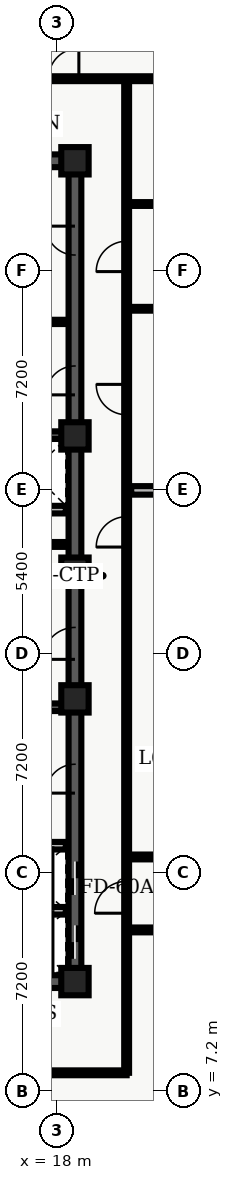
"""IFC4 building model, lengths in metres.
Left out: names, types, materials, properties, quantities, classifications, styles, units other than length and angle.
Written with IfcOpenShell. Run it as: python <this file> out.ifc"""

import sys

from ifc_helpers import new_model, entity, si_unit, converted_unit, direction, frame, origin_with_axes, origin_2d_with_axis, place, context, subcontext, project, spatial, polyline, rectangle, outline, extrude, element, fill, save


model = new_model("IFC4")
c1 = context("Model", 3, precision=1e-05, world=origin_with_axes(), true_north=direction((0.0, 1.0)))
c2 = subcontext(c1, "Body", "Model", "MODEL_VIEW")
j1 = project(units=[si_unit("LENGTHUNIT", "METRE"), converted_unit("PLANEANGLEUNIT", "DEGREE", entity("IfcPlaneAngleMeasure", 0.017), si_unit("PLANEANGLEUNIT", "RADIAN"), dimensions=[0, 0, 0, 0, 0, 0, 0])], contexts=[c1])
p1 = place(None, origin_with_axes())
s1 = spatial("IfcSite", under=j1, at=p1, CompositionType="ELEMENT")
p2 = place(p1, origin_with_axes())
s2 = spatial("IfcBuilding", under=s1, at=p2, CompositionType="ELEMENT")
p3 = place(p2, frame((0.0, 0.0, 244.2), z_axis=(0.0, 0.0, 1.0), x_axis=(1.0, 0.0, 0.0)))
s3 = spatial("IfcBuildingStorey", under=s2, at=p3, CompositionType="ELEMENT", Elevation=244.2)
p4 = place(p3, frame((11.4, 10.8, 0.0), z_axis=(0.0, 0.0, 1.0), x_axis=(1.0, 0.0, 0.0)))
e1 = element("IfcWall", 1, at=p4, inside=s3, PredefinedType="SHEAR", context=c2, shape_type="SweptSolid", body=[
    extrude(outline(polyline([(0.0, -0.21), (7.2, -0.21), (7.2, 0.21), (0.0, 0.21), (0.0, -0.21)])), origin_with_axes(), (0.0, 0.0, 1.0), 3.6),
])
p5 = place(p4, frame((2.625, 0.0, 0.0), z_axis=(0.0, 0.0, 1.0), x_axis=(1.0, 0.0, 0.0)))
e2 = element("IfcOpeningElement", 2, at=p5, cuts=e1, PredefinedType="OPENING", context=c2, shape_type="SweptSolid", body=[
    extrude(rectangle(XDim=1.05, YDim=0.44, at=origin_2d_with_axis()), origin_with_axes(), (0.0, 0.0, 1.0), 2.15),
])
p6 = place(p3, frame((11.4, 37.8, 0.0), z_axis=(0.0, 0.0, 1.0), x_axis=(1.0, 0.0, 0.0)))
e3 = element("IfcWall", 3, at=p6, inside=s3, PredefinedType="SHEAR", context=c2, shape_type="SweptSolid", body=[
    extrude(outline(polyline([(0.0, -0.21), (7.2, -0.21), (7.2, 0.21), (0.0, 0.21), (0.0, -0.21)])), origin_with_axes(), (0.0, 0.0, 1.0), 3.6),
])
p7 = place(p6, frame((2.625, 0.0, 0.0), z_axis=(0.0, 0.0, 1.0), x_axis=(1.0, 0.0, 0.0)))
e4 = element("IfcOpeningElement", 4, at=p7, cuts=e3, PredefinedType="OPENING", context=c2, shape_type="SweptSolid", body=[
    extrude(rectangle(XDim=1.05, YDim=0.44, at=origin_2d_with_axis()), origin_with_axes(), (0.0, 0.0, 1.0), 2.15),
])
p8 = place(p3, frame((18.6, 10.8, 0.0), z_axis=(0.0, 0.0, 1.0), x_axis=(0.0, 1.0, 0.0)))
e5 = element("IfcWall", 5, at=p8, inside=s3, PredefinedType="SHEAR", context=c2, shape_type="SweptSolid", body=[
    extrude(outline(polyline([(0.0, -0.21), (13.5, -0.21), (13.5, 0.21), (0.0, 0.21), (0.0, -0.21)])), origin_with_axes(), (0.0, 0.0, 1.0), 3.6),
])
p9 = place(p8, frame((1.3, 0.0, 0.0), z_axis=(0.0, 0.0, 1.0), x_axis=(1.0, 0.0, 0.0)))
e6 = element("IfcOpeningElement", 6, at=p9, cuts=e5, PredefinedType="OPENING", context=c2, shape_type="SweptSolid", body=[
    extrude(rectangle(XDim=1.1, YDim=0.44, at=origin_2d_with_axis()), origin_with_axes(), (0.0, 0.0, 1.0), 2.15),
])
p10 = place(p8, frame((3.4, 0.0, 0.0), z_axis=(0.0, 0.0, 1.0), x_axis=(1.0, 0.0, 0.0)))
e7 = element("IfcOpeningElement", 7, at=p10, cuts=e5, PredefinedType="OPENING", context=c2, shape_type="SweptSolid", body=[
    extrude(rectangle(XDim=1.1, YDim=0.44, at=origin_2d_with_axis()), origin_with_axes(), (0.0, 0.0, 1.0), 2.15),
])
p11 = place(p8, frame((11.125, 0.0, 0.0), z_axis=(0.0, 0.0, 1.0), x_axis=(1.0, 0.0, 0.0)))
e8 = element("IfcOpeningElement", 8, at=p11, cuts=e5, PredefinedType="OPENING", context=c2, shape_type="SweptSolid", body=[
    extrude(rectangle(XDim=1.05, YDim=0.44, at=origin_2d_with_axis()), origin_with_axes(), (0.0, 0.0, 1.0), 2.15),
])
p12 = place(p8, frame((6.675, 0.0, 0.0), z_axis=(0.0, 0.0, 1.0), x_axis=(1.0, 0.0, 0.0)))
e9 = element("IfcOpeningElement", 9, at=p12, cuts=e5, PredefinedType="OPENING", context=c2, shape_type="SweptSolid", body=[
    extrude(rectangle(XDim=0.95, YDim=0.44, at=origin_2d_with_axis()), origin_with_axes(), (0.0, 0.0, 1.0), 2.15),
])
p13 = place(p3, frame((18.6, 24.3, 0.0), z_axis=(0.0, 0.0, 1.0), x_axis=(0.0, 1.0, 0.0)))
e10 = element("IfcWall", 10, at=p13, inside=s3, PredefinedType="SHEAR", context=c2, shape_type="SweptSolid", body=[
    extrude(outline(polyline([(0.0, -0.21), (13.5, -0.21), (13.5, 0.21), (0.0, 0.21), (0.0, -0.21)])), origin_with_axes(), (0.0, 0.0, 1.0), 3.6),
])
p14 = place(p13, frame((6.275, 0.0, 0.0), z_axis=(0.0, 0.0, 1.0), x_axis=(1.0, 0.0, 0.0)))
e11 = element("IfcOpeningElement", 11, at=p14, cuts=e10, PredefinedType="OPENING", context=c2, shape_type="SweptSolid", body=[
    extrude(rectangle(XDim=0.95, YDim=0.44, at=origin_2d_with_axis()), origin_with_axes(), (0.0, 0.0, 1.0), 2.15),
])
p15 = place(p13, frame((10.875, 0.0, 0.0), z_axis=(0.0, 0.0, 1.0), x_axis=(1.0, 0.0, 0.0)))
e12 = element("IfcOpeningElement", 12, at=p15, cuts=e10, PredefinedType="OPENING", context=c2, shape_type="SweptSolid", body=[
    extrude(rectangle(XDim=0.95, YDim=0.44, at=origin_2d_with_axis()), origin_with_axes(), (0.0, 0.0, 1.0), 2.15),
])
for number, where, z_axis, x_axis in (
    (13, (11.61, 19.825, 0.0), (0.0, 0.0, 1.0), (1.0, 0.0, 0.0)),
    (14, (11.61, 28.775, 0.0), (0.0, 0.0, 1.0), (1.0, 0.0, 0.0)),
):
    element("IfcWall", number, at=place(p3, frame(where, z_axis=z_axis, x_axis=x_axis)), inside=s3, PredefinedType="SHEAR", context=c2, shape_type="SweptSolid", body=[
        extrude(outline(polyline([(0.0, -0.125), (6.78, -0.125), (6.78, 0.125), (0.0, 0.125), (0.0, -0.125)])), origin_with_axes(), (0.0, 0.0, 1.0), 3.6),
    ])
p16 = place(p3, frame((11.7, 24.1, 0.0), z_axis=(0.0, 0.0, 1.0), x_axis=(1.0, 0.0, 0.0)))
e15 = element("IfcWall", 15, at=p16, inside=s3, PredefinedType="SOLIDWALL", context=c2, shape_type="SweptSolid", body=[
    extrude(outline(polyline([(0.0, -0.125), (6.6, -0.125), (6.6, 0.125), (0.0, 0.125), (0.0, -0.125)])), origin_with_axes(), (0.0, 0.0, 1.0), 2.64),
])
p17 = place(p16, frame((3.75, 0.0, 0.0), z_axis=(0.0, 0.0, 1.0), x_axis=(1.0, 0.0, 0.0)))
e16 = element("IfcOpeningElement", 16, at=p17, cuts=e15, PredefinedType="OPENING", context=c2, shape_type="SweptSolid", body=[
    extrude(rectangle(XDim=0.9, YDim=0.27, at=origin_2d_with_axis()), origin_with_axes(), (0.0, 0.0, 1.0), 2.15),
])
p18 = place(p3, frame((11.7, 26.325, 0.0), z_axis=(0.0, 0.0, 1.0), x_axis=(1.0, 0.0, 0.0)))
e17 = element("IfcWall", 17, at=p18, inside=s3, PredefinedType="SOLIDWALL", context=c2, shape_type="SweptSolid", body=[
    extrude(outline(polyline([(0.0, -0.125), (6.6, -0.125), (6.6, 0.125), (0.0, 0.125), (0.0, -0.125)])), origin_with_axes(), (0.0, 0.0, 1.0), 2.64),
])
p19 = place(p18, frame((3.5, 0.0, 0.0), z_axis=(0.0, 0.0, 1.0), x_axis=(1.0, 0.0, 0.0)))
e18 = element("IfcOpeningElement", 18, at=p19, cuts=e17, PredefinedType="OPENING", context=c2, shape_type="SweptSolid", body=[
    extrude(rectangle(XDim=0.9, YDim=0.27, at=origin_2d_with_axis()), origin_with_axes(), (0.0, 0.0, 1.0), 2.15),
])
for number, where, z_axis, x_axis in (
    (19, (18.6, 10.8, 0.0), (0.0, 0.0, 1.0), (1.0, 0.0, 0.0)),
    (20, (18.6, 20.1, 0.0), (0.0, 0.0, 1.0), (1.0, 0.0, 0.0)),
    (21, (18.6, 24.3, 0.0), (0.0, 0.0, 1.0), (1.0, 0.0, 0.0)),
    (22, (18.6, 28.75, 0.0), (0.0, 0.0, 1.0), (1.0, 0.0, 0.0)),
    (23, (18.6, 37.8, 0.0), (0.0, 0.0, 1.0), (1.0, 0.0, 0.0)),
):
    element("IfcColumn", number, at=place(p3, frame(where, z_axis=z_axis, x_axis=x_axis)), inside=s3, PredefinedType="COLUMN", context=c2, shape_type="SweptSolid", body=[
        extrude(rectangle(XDim=0.9, YDim=0.9, at=origin_2d_with_axis()), origin_with_axes(), (0.0, 0.0, 1.0), 3.9),
    ])
p20 = place(p3, frame((14.62, 25.18, 0.0), z_axis=(0.0, 0.0, 1.0), x_axis=(1.0, 0.0, 0.0)))
e24 = element("IfcWall", 24, at=p20, inside=s3, PredefinedType="PARTITIONING", context=c2, shape_type="SweptSolid", body=[
    extrude(outline(polyline([(0.0, -0.08), (3.68, -0.08), (3.68, 0.08), (0.0, 0.08), (0.0, -0.08)])), origin_with_axes(), (0.0, 0.0, 1.0), 2.64),
])
p21 = place(p20, frame((1.95, 0.0, 0.0), z_axis=(0.0, 0.0, 1.0), x_axis=(1.0, 0.0, 0.0)))
e25 = element("IfcOpeningElement", 25, at=p21, cuts=e24, PredefinedType="OPENING", context=c2, shape_type="SweptSolid", body=[
    extrude(rectangle(XDim=0.9, YDim=0.18, at=origin_2d_with_axis()), origin_with_axes(), (0.0, 0.0, 1.0), 2.15),
])
for number, where, z_axis, x_axis in (
    (26, (15.84, 13.13, 0.0), (0.0, 0.0, 1.0), (1.0, 0.0, 0.0)),
    (27, (15.84, 15.27, 0.0), (0.0, 0.0, 1.0), (1.0, 0.0, 0.0)),
):
    element("IfcWall", number, at=place(p3, frame(where, z_axis=z_axis, x_axis=x_axis)), inside=s3, PredefinedType="SOLIDWALL", context=c2, shape_type="SweptSolid", body=[
        extrude(outline(polyline([(0.0, -0.125), (2.46, -0.125), (2.46, 0.125), (0.0, 0.125), (0.0, -0.125)])), origin_with_axes(), (0.0, 0.0, 1.0), 2.64),
    ])
p22 = place(p3, frame((15.84, 32.5, 0.0), z_axis=(0.0, 0.0, 1.0), x_axis=(1.0, 0.0, 0.0)))
e28 = element("IfcWall", 28, at=p22, inside=s3, PredefinedType="PARTITIONING", context=c2, shape_type="SweptSolid", body=[
    extrude(outline(polyline([(0.0, -0.07), (2.46, -0.07), (2.46, 0.07), (0.0, 0.07), (0.0, -0.07)])), origin_with_axes(), (0.0, 0.0, 1.0), 2.64),
])
p23 = place(p3, frame((7.1, 7.8, 0.0), z_axis=(0.0, 0.0, 1.0), x_axis=(1.0, 0.0, 0.0)))
e29 = element("IfcWall", 29, at=p23, inside=s3, PredefinedType="PARTITIONING", context=c2, shape_type="SweptSolid", body=[
    extrude(outline(polyline([(0.0, -0.08), (13.2, -0.08), (13.2, 0.08), (0.0, 0.08), (0.0, -0.08)])), origin_with_axes(), (0.0, 0.0, 1.0), 2.64),
])
p24 = place(p23, frame((6.57, 0.0, 0.0), z_axis=(0.0, 0.0, 1.0), x_axis=(1.0, 0.0, 0.0)))
e30 = element("IfcOpeningElement", 30, at=p24, cuts=e29, PredefinedType="OPENING", context=c2, shape_type="SweptSolid", body=[
    extrude(rectangle(XDim=1.2, YDim=0.18, at=origin_2d_with_axis()), origin_with_axes(), (0.0, 0.0, 1.0), 2.2),
])
p25 = place(p3, frame((7.1, 40.5, 0.0), z_axis=(0.0, 0.0, 1.0), x_axis=(1.0, 0.0, 0.0)))
e31 = element("IfcWall", 31, at=p25, inside=s3, PredefinedType="PARTITIONING", context=c2, shape_type="SweptSolid", body=[
    extrude(outline(polyline([(0.0, -0.08), (24.965, -0.08), (24.965, 0.08), (0.0, 0.08), (0.0, -0.08)])), origin_with_axes(), (0.0, 0.0, 1.0), 2.64),
])
p26 = place(p25, frame((4.38, 0.0, 0.0), z_axis=(0.0, 0.0, 1.0), x_axis=(1.0, 0.0, 0.0)))
e32 = element("IfcOpeningElement", 32, at=p26, cuts=e31, PredefinedType="OPENING", context=c2, shape_type="SweptSolid", body=[
    extrude(rectangle(XDim=1.0, YDim=0.18, at=origin_2d_with_axis()), origin_with_axes(), (0.0, 0.0, 1.0), 2.15),
])
p27 = place(p25, frame((7.566, 0.0, 0.0), z_axis=(0.0, 0.0, 1.0), x_axis=(1.0, 0.0, 0.0)))
e33 = element("IfcOpeningElement", 33, at=p27, cuts=e31, PredefinedType="OPENING", context=c2, shape_type="SweptSolid", body=[
    extrude(rectangle(XDim=1.0, YDim=0.18, at=origin_2d_with_axis()), origin_with_axes(), (0.0, 0.0, 1.0), 2.15),
])
p28 = place(p25, frame((11.129, 0.0, 0.0), z_axis=(0.0, 0.0, 1.0), x_axis=(1.0, 0.0, 0.0)))
e34 = element("IfcOpeningElement", 34, at=p28, cuts=e31, PredefinedType="OPENING", context=c2, shape_type="SweptSolid", body=[
    extrude(rectangle(XDim=1.0, YDim=0.18, at=origin_2d_with_axis()), origin_with_axes(), (0.0, 0.0, 1.0), 2.15),
])
p29 = place(p3, frame((20.3, 7.8, 0.0), z_axis=(0.0, 0.0, 1.0), x_axis=(0.0, 1.0, 0.0)))
e35 = element("IfcWall", 35, at=p29, inside=s3, PredefinedType="PARTITIONING", context=c2, shape_type="SweptSolid", body=[
    extrude(outline(polyline([(0.0, -0.08), (32.7, -0.08), (32.7, 0.08), (0.0, 0.08), (0.0, -0.08)])), origin_with_axes(), (0.0, 0.0, 1.0), 2.64),
])
p30 = place(p29, frame((17.794, 0.0, 0.0), z_axis=(0.0, 0.0, 1.0), x_axis=(1.0, 0.0, 0.0)))
e36 = element("IfcOpeningElement", 36, at=p30, cuts=e35, PredefinedType="OPENING", context=c2, shape_type="SweptSolid", body=[
    extrude(rectangle(XDim=1.0, YDim=0.18, at=origin_2d_with_axis()), origin_with_axes(), (0.0, 0.0, 1.0), 2.15),
])
p31 = place(p29, frame((22.145, 0.0, 0.0), z_axis=(0.0, 0.0, 1.0), x_axis=(1.0, 0.0, 0.0)))
e37 = element("IfcOpeningElement", 37, at=p31, cuts=e35, PredefinedType="OPENING", context=c2, shape_type="SweptSolid", body=[
    extrude(rectangle(XDim=1.0, YDim=0.18, at=origin_2d_with_axis()), origin_with_axes(), (0.0, 0.0, 1.0), 2.15),
])
p32 = place(p29, frame((26.855, 0.0, 0.0), z_axis=(0.0, 0.0, 1.0), x_axis=(1.0, 0.0, 0.0)))
e38 = element("IfcOpeningElement", 38, at=p32, cuts=e35, PredefinedType="OPENING", context=c2, shape_type="SweptSolid", body=[
    extrude(rectangle(XDim=1.0, YDim=0.18, at=origin_2d_with_axis()), origin_with_axes(), (0.0, 0.0, 1.0), 2.15),
])
p33 = place(p29, frame((5.775, 0.0, 0.0), z_axis=(0.0, 0.0, 1.0), x_axis=(1.0, 0.0, 0.0)))
e39 = element("IfcOpeningElement", 39, at=p33, cuts=e35, PredefinedType="OPENING", context=c2, shape_type="SweptSolid", body=[
    extrude(rectangle(XDim=1.05, YDim=0.18, at=origin_2d_with_axis()), origin_with_axes(), (0.0, 0.0, 1.0), 2.15),
])
p34 = place(p3, frame((20.45, 26.958, 0.0), z_axis=(0.0, 0.0, 1.0), x_axis=(1.0, 0.0, 0.0)))
e40 = element("IfcWall", 40, at=p34, inside=s3, PredefinedType="PARTITIONING", context=c2, shape_type="SweptSolid", body=[
    extrude(outline(polyline([(0.0, -0.14), (11.615, -0.14), (11.615, 0.14), (0.0, 0.14), (0.0, -0.14)])), origin_with_axes(), (0.0, 0.0, 1.0), 2.64),
])
p35 = place(p3, frame((20.45, 32.932, 0.0), z_axis=(0.0, 0.0, 1.0), x_axis=(1.0, 0.0, 0.0)))
e41 = element("IfcWall", 41, at=p35, inside=s3, PredefinedType="PARTITIONING", context=c2, shape_type="SweptSolid", body=[
    extrude(outline(polyline([(0.0, -0.062), (11.615, -0.062), (11.615, 0.062), (0.0, 0.062), (0.0, -0.062)])), origin_with_axes(), (0.0, 0.0, 1.0), 2.64),
])
p36 = place(p3, frame((20.45, 36.378, 0.0), z_axis=(0.0, 0.0, 1.0), x_axis=(1.0, 0.0, 0.0)))
e42 = element("IfcWall", 42, at=p36, inside=s3, PredefinedType="PARTITIONING", context=c2, shape_type="SweptSolid", body=[
    extrude(outline(polyline([(0.0, -0.062), (11.615, -0.062), (11.615, 0.062), (0.0, 0.062), (0.0, -0.062)])), origin_with_axes(), (0.0, 0.0, 1.0), 2.64),
])
p37 = place(p36, frame((3.175, 0.0, 0.0), z_axis=(0.0, 0.0, 1.0), x_axis=(1.0, 0.0, 0.0)))
e43 = element("IfcOpeningElement", 43, at=p37, cuts=e42, PredefinedType="OPENING", context=c2, shape_type="SweptSolid", body=[
    extrude(rectangle(XDim=0.95, YDim=0.145, at=origin_2d_with_axis()), origin_with_axes(), (0.0, 0.0, 1.0), 2.15),
])
p38 = place(p3, frame((20.3, 12.5, 0.0), z_axis=(0.0, 0.0, 1.0), x_axis=(1.0, 0.0, 0.0)))
e44 = element("IfcWall", 44, at=p38, inside=s3, PredefinedType="PARTITIONING", context=c2, shape_type="SweptSolid", body=[
    extrude(outline(polyline([(0.0, -0.08), (16.05, -0.08), (16.05, 0.08), (0.0, 0.08), (0.0, -0.08)])), origin_with_axes(), (0.0, 0.0, 1.0), 2.64),
])
p39 = place(p38, frame((8.075, 0.0, 0.0), z_axis=(0.0, 0.0, 1.0), x_axis=(1.0, 0.0, 0.0)))
e45 = element("IfcOpeningElement", 45, at=p39, cuts=e44, PredefinedType="OPENING", context=c2, shape_type="SweptSolid", body=[
    extrude(rectangle(XDim=1.0, YDim=0.18, at=origin_2d_with_axis()), origin_with_axes(), (0.0, 0.0, 1.0), 2.15),
])
p40 = place(p3, frame((20.3, 14.9, 0.0), z_axis=(0.0, 0.0, 1.0), x_axis=(1.0, 0.0, 0.0)))
e46 = element("IfcWall", 46, at=p40, inside=s3, PredefinedType="PARTITIONING", context=c2, shape_type="SweptSolid", body=[
    extrude(outline(polyline([(0.0, -0.08), (16.05, -0.08), (16.05, 0.08), (0.0, 0.08), (0.0, -0.08)])), origin_with_axes(), (0.0, 0.0, 1.0), 2.64),
])
p41 = place(p40, frame((1.827, 0.0, 0.0), z_axis=(0.0, 0.0, 1.0), x_axis=(1.0, 0.0, 0.0)))
e47 = element("IfcOpeningElement", 47, at=p41, cuts=e46, PredefinedType="OPENING", context=c2, shape_type="SweptSolid", body=[
    extrude(rectangle(XDim=1.0, YDim=0.18, at=origin_2d_with_axis()), origin_with_axes(), (0.0, 0.0, 1.0), 2.15),
])
p42 = place(p40, frame((5.386, 0.0, 0.0), z_axis=(0.0, 0.0, 1.0), x_axis=(1.0, 0.0, 0.0)))
e48 = element("IfcOpeningElement", 48, at=p42, cuts=e46, PredefinedType="OPENING", context=c2, shape_type="SweptSolid", body=[
    extrude(rectangle(XDim=1.0, YDim=0.18, at=origin_2d_with_axis()), origin_with_axes(), (0.0, 0.0, 1.0), 2.15),
])
p43 = place(p40, frame((9.236, 0.0, 0.0), z_axis=(0.0, 0.0, 1.0), x_axis=(1.0, 0.0, 0.0)))
e49 = element("IfcOpeningElement", 49, at=p43, cuts=e46, PredefinedType="OPENING", context=c2, shape_type="SweptSolid", body=[
    extrude(rectangle(XDim=1.0, YDim=0.18, at=origin_2d_with_axis()), origin_with_axes(), (0.0, 0.0, 1.0), 2.15),
])
p44 = place(p40, frame((13.572, 0.0, 0.0), z_axis=(0.0, 0.0, 1.0), x_axis=(1.0, 0.0, 0.0)))
e50 = element("IfcOpeningElement", 50, at=p44, cuts=e46, PredefinedType="OPENING", context=c2, shape_type="SweptSolid", body=[
    extrude(rectangle(XDim=1.0, YDim=0.18, at=origin_2d_with_axis()), origin_with_axes(), (0.0, 0.0, 1.0), 2.15),
])
p45 = place(p8, frame((1.3, 0.0, 0.0), z_axis=(0.0, 0.0, 1.0), x_axis=(1.0, 0.0, 0.0)))
e51 = element("IfcDoor", 51, at=p45, inside=s3, OperationType="SLIDING_TO_LEFT", PredefinedType="DOOR", context=c2, shape_type="SweptSolid", body=[
    extrude(rectangle(XDim=1.1, YDim=0.09, at=origin_2d_with_axis()), origin_with_axes(), (0.0, 0.0, 1.0), 2.15),
])
fill(e6, e51)
p46 = place(p8, frame((3.4, 0.0, 0.0), z_axis=(0.0, 0.0, 1.0), x_axis=(1.0, 0.0, 0.0)))
e52 = element("IfcDoor", 52, at=p46, inside=s3, OperationType="SLIDING_TO_RIGHT", PredefinedType="DOOR", context=c2, shape_type="SweptSolid", body=[
    extrude(rectangle(XDim=1.1, YDim=0.09, at=origin_2d_with_axis()), origin_with_axes(), (0.0, 0.0, 1.0), 2.15),
])
fill(e7, e52)
p47 = place(p8, frame((11.125, 0.0, 0.0), z_axis=(0.0, 0.0, 1.0), x_axis=(1.0, 0.0, 0.0)))
e53 = element("IfcDoor", 53, at=p47, inside=s3, OperationType="SINGLE_SWING_LEFT", PredefinedType="DOOR", context=c2, shape_type="SweptSolid", body=[
    extrude(rectangle(XDim=1.05, YDim=0.09, at=origin_2d_with_axis()), origin_with_axes(), (0.0, 0.0, 1.0), 2.15),
])
fill(e8, e53)
p48 = place(p8, frame((6.675, 0.0, 0.0), z_axis=(0.0, 0.0, 1.0), x_axis=(1.0, 0.0, 0.0)))
e54 = element("IfcDoor", 54, at=p48, inside=s3, OperationType="SINGLE_SWING_LEFT", PredefinedType="DOOR", context=c2, shape_type="SweptSolid", body=[
    extrude(rectangle(XDim=0.95, YDim=0.09, at=origin_2d_with_axis()), origin_with_axes(), (0.0, 0.0, 1.0), 2.15),
])
fill(e9, e54)
p49 = place(p13, frame((6.275, 0.0, 0.0), z_axis=(0.0, 0.0, 1.0), x_axis=(1.0, 0.0, 0.0)))
e55 = element("IfcDoor", 55, at=p49, inside=s3, OperationType="SINGLE_SWING_LEFT", PredefinedType="DOOR", context=c2, shape_type="SweptSolid", body=[
    extrude(rectangle(XDim=0.95, YDim=0.09, at=origin_2d_with_axis()), origin_with_axes(), (0.0, 0.0, 1.0), 2.15),
])
fill(e11, e55)
p50 = place(p13, frame((10.875, 0.0, 0.0), z_axis=(0.0, 0.0, 1.0), x_axis=(1.0, 0.0, 0.0)))
e56 = element("IfcDoor", 56, at=p50, inside=s3, OperationType="SINGLE_SWING_RIGHT", PredefinedType="DOOR", context=c2, shape_type="SweptSolid", body=[
    extrude(rectangle(XDim=0.95, YDim=0.09, at=origin_2d_with_axis()), origin_with_axes(), (0.0, 0.0, 1.0), 2.15),
])
fill(e12, e56)
p51 = place(p25, frame((11.129, 0.0, 0.0), z_axis=(0.0, 0.0, 1.0), x_axis=(1.0, 0.0, 0.0)))
e57 = element("IfcDoor", 57, at=p51, inside=s3, OperationType="SINGLE_SWING_RIGHT", PredefinedType="DOOR", context=c2, shape_type="SweptSolid", body=[
    extrude(rectangle(XDim=1.0, YDim=0.09, at=origin_2d_with_axis()), origin_with_axes(), (0.0, 0.0, 1.0), 2.15),
])
fill(e34, e57)
p52 = place(p29, frame((17.794, 0.0, 0.0), z_axis=(0.0, 0.0, 1.0), x_axis=(1.0, 0.0, 0.0)))
e58 = element("IfcDoor", 58, at=p52, inside=s3, OperationType="SINGLE_SWING_LEFT", PredefinedType="DOOR", context=c2, shape_type="SweptSolid", body=[
    extrude(rectangle(XDim=1.0, YDim=0.09, at=origin_2d_with_axis()), origin_with_axes(), (0.0, 0.0, 1.0), 2.15),
])
fill(e36, e58)
p53 = place(p29, frame((22.145, 0.0, 0.0), z_axis=(0.0, 0.0, 1.0), x_axis=(1.0, 0.0, 0.0)))
e59 = element("IfcDoor", 59, at=p53, inside=s3, OperationType="SINGLE_SWING_RIGHT", PredefinedType="DOOR", context=c2, shape_type="SweptSolid", body=[
    extrude(rectangle(XDim=1.0, YDim=0.09, at=origin_2d_with_axis()), origin_with_axes(), (0.0, 0.0, 1.0), 2.15),
])
fill(e37, e59)
p54 = place(p29, frame((26.855, 0.0, 0.0), z_axis=(0.0, 0.0, 1.0), x_axis=(1.0, 0.0, 0.0)))
e60 = element("IfcDoor", 60, at=p54, inside=s3, OperationType="SINGLE_SWING_LEFT", PredefinedType="DOOR", context=c2, shape_type="SweptSolid", body=[
    extrude(rectangle(XDim=1.0, YDim=0.09, at=origin_2d_with_axis()), origin_with_axes(), (0.0, 0.0, 1.0), 2.15),
])
fill(e38, e60)
p55 = place(p29, frame((5.775, 0.0, 0.0), z_axis=(0.0, 0.0, 1.0), x_axis=(1.0, 0.0, 0.0)))
e61 = element("IfcDoor", 61, at=p55, inside=s3, OperationType="SINGLE_SWING_LEFT", PredefinedType="DOOR", context=c2, shape_type="SweptSolid", body=[
    extrude(rectangle(XDim=1.05, YDim=0.09, at=origin_2d_with_axis()), origin_with_axes(), (0.0, 0.0, 1.0), 2.15),
])
fill(e39, e61)
save(model, sys.argv[1])
